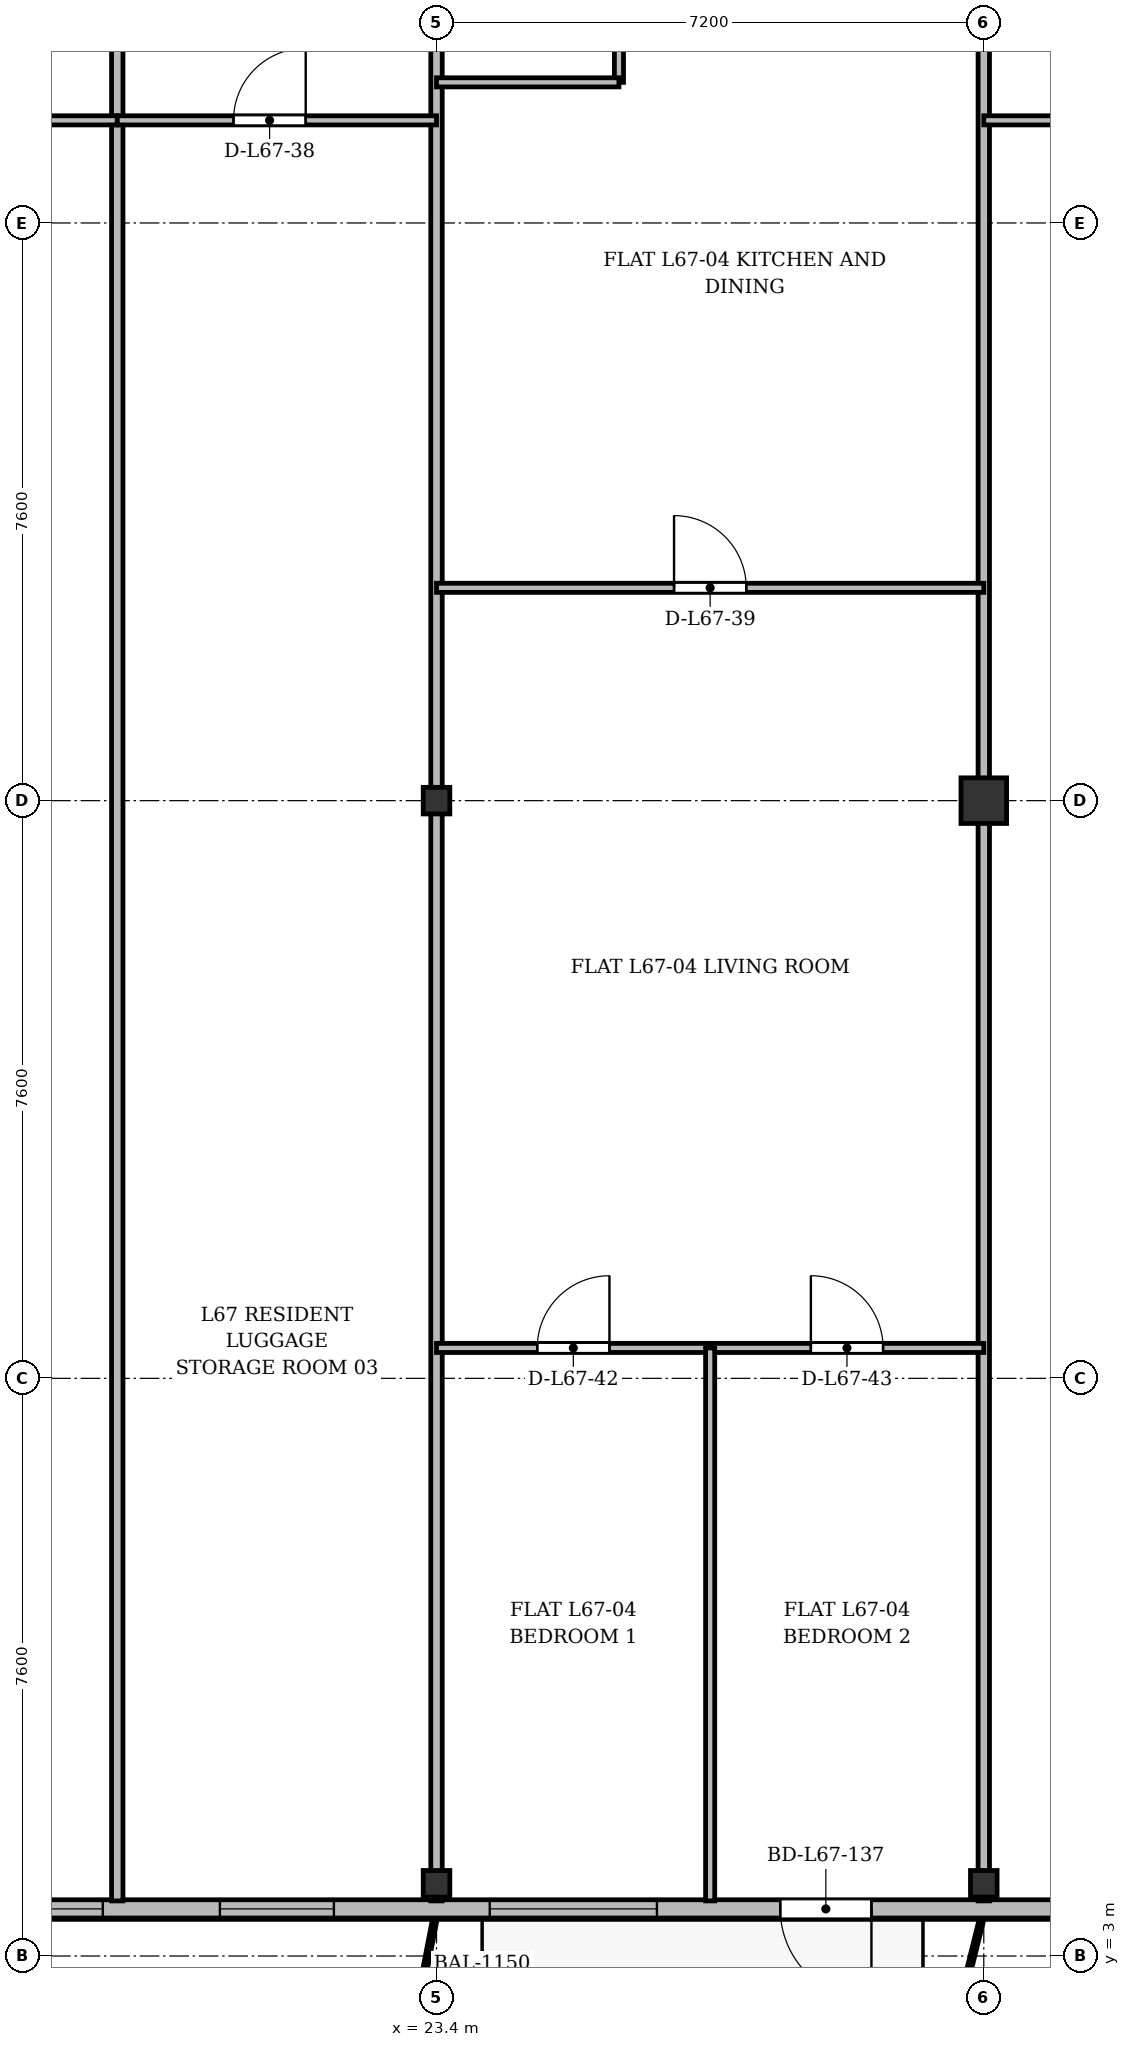
"""IFC4 building model, lengths in metres.
Left out: names, types, materials, properties, quantities, classifications, styles, units other than length and angle.
Written with IfcOpenShell. Run it as: python <this file> out.ifc"""

import sys

from ifc_helpers import new_model, si_unit, direction, frame, frame_2d, origin, origin_2d, place, context, subcontext, project, spatial, rectangle, i_section, extrude, source, transform, mapped, element, fill, save


model = new_model("IFC4")
c1 = context("Model", 3, precision=1e-05, world=origin(), true_north=direction((0.0, 1.0)))
c2 = subcontext(c1, "Body", "Model", "MODEL_VIEW")
j1 = project(units=[si_unit("LENGTHUNIT", "METRE"), si_unit("PLANEANGLEUNIT", "RADIAN")], contexts=[c1])
p1 = place(None, origin())
s1 = spatial("IfcSite", under=j1, at=p1, CompositionType="ELEMENT")
p2 = place(p1, origin())
s2 = spatial("IfcBuilding", under=s1, at=p2, CompositionType="ELEMENT")
p3 = place(p2, frame((0.0, 0.0, 259.5)))
s3 = spatial("IfcBuildingStorey", under=s2, at=p3, CompositionType="ELEMENT", Elevation=259.5)
m1 = source(origin(), c2, "Body", "SweptSolid", [
    extrude(i_section(OverallWidth=0.35, OverallDepth=0.35, WebThickness=0.018, FlangeThickness=0.028, at=origin_2d()), origin(), (0.0, 0.0, 1.0), 3.6),
])
for number, where, z_axis, x_axis in (
    (1, (23.4, 3.95, 0.0), (0.0, 0.0, 1.0), (1.0, 0.0, 0.0)),
    (2, (23.4, 18.2, 0.0), (0.0, 0.0, 1.0), (1.0, 0.0, 0.0)),
    (3, (30.6, 3.95, 0.0), (0.0, 0.0, 1.0), (1.0, 0.0, 0.0)),
):
    element("IfcColumn", number, at=place(p3, frame(where, z_axis=z_axis, x_axis=x_axis)), inside=s3, PredefinedType="COLUMN", context=c2, shape_type="MappedRepresentation", body=[
        mapped(m1, transform((0.0, 0.0, 0.0), x_axis=(1.0, 0.0, 0.0), y_axis=(0.0, 1.0, 0.0), z_axis=(0.0, 0.0, 1.0), scale=1.0)),
    ])
m2 = source(origin(), c2, "Body", "SweptSolid", [
    extrude(rectangle(XDim=0.6, YDim=0.6, at=origin_2d()), origin(), (0.0, 0.0, 1.0), 3.6),
])
p4 = place(p3, frame((30.6, 18.2, 0.0), z_axis=(0.0, 0.0, 1.0), x_axis=(1.0, 0.0, 0.0)))
e4 = element("IfcColumn", 4, at=p4, inside=s3, PredefinedType="COLUMN", context=c2, shape_type="MappedRepresentation", body=[
    mapped(m2, transform((0.0, 0.0, 0.0), x_axis=(1.0, 0.0, 0.0), y_axis=(0.0, 1.0, 0.0), z_axis=(0.0, 0.0, 1.0), scale=1.0)),
])
p5 = place(p3, frame((63.2, 3.62, 0.0), z_axis=(0.0, 0.0, 1.0), x_axis=(-1.0, 0.0, 0.0)))
e5 = element("IfcWall", 5, at=p5, inside=s3, PredefinedType="SOLIDWALL", context=c2, shape_type="SweptSolid", body=[
    extrude(rectangle(XDim=52.0, YDim=0.24, at=frame_2d((26.0, 0.0))), origin(), (0.0, 0.0, 1.0), 3.37),
])
p6 = place(p5, frame((0.345, 0.0, 0.9)))
e6 = element("IfcOpeningElement", 6, at=p6, cuts=e5, PredefinedType="OPENING", context=c2, shape_type="SweptSolid", body=[
    extrude(rectangle(XDim=1.2, YDim=1.65, at=frame_2d((0.6, 0.825))), frame((0.0, 0.13, 0.0), z_axis=(0.0, -1.0, 0.0), x_axis=(1.0, 0.0, 0.0)), (0.0, 0.0, 1.0), 0.26),
])
p7 = place(p5, frame((2.05, 0.0, 0.9)))
e7 = element("IfcOpeningElement", 7, at=p7, cuts=e5, PredefinedType="OPENING", context=c2, shape_type="SweptSolid", body=[
    extrude(rectangle(XDim=2.0, YDim=1.95, at=frame_2d((1.0, 0.975))), frame((0.0, 0.13, 0.0), z_axis=(0.0, -1.0, 0.0), x_axis=(1.0, 0.0, 0.0)), (0.0, 0.0, 1.0), 0.26),
])
p8 = place(p5, frame((5.42, 0.0, 0.0)))
e8 = element("IfcOpeningElement", 8, at=p8, cuts=e5, PredefinedType="OPENING", context=c2, shape_type="SweptSolid", body=[
    extrude(rectangle(XDim=1.2, YDim=2.2, at=frame_2d((0.6, 1.1))), frame((0.0, 0.13, 0.0), z_axis=(0.0, -1.0, 0.0), x_axis=(1.0, 0.0, 0.0)), (0.0, 0.0, 1.0), 0.26),
])
p9 = place(p5, frame((8.6, 0.0, 0.9)))
e9 = element("IfcOpeningElement", 9, at=p9, cuts=e5, PredefinedType="OPENING", context=c2, shape_type="SweptSolid", body=[
    extrude(rectangle(XDim=1.8, YDim=1.8, at=frame_2d((0.9, 0.9))), frame((0.0, 0.13, 0.0), z_axis=(0.0, -1.0, 0.0), x_axis=(1.0, 0.0, 0.0)), (0.0, 0.0, 1.0), 0.26),
])
p10 = place(p5, frame((14.7, 0.0, 0.9)))
e10 = element("IfcOpeningElement", 10, at=p10, cuts=e5, PredefinedType="OPENING", context=c2, shape_type="SweptSolid", body=[
    extrude(rectangle(XDim=2.2, YDim=1.8, at=frame_2d((1.1, 0.9))), frame((0.0, 0.13, 0.0), z_axis=(0.0, -1.0, 0.0), x_axis=(1.0, 0.0, 0.0)), (0.0, 0.0, 1.0), 0.26),
])
p11 = place(p5, frame((20.5, 0.0, 0.9)))
e11 = element("IfcOpeningElement", 11, at=p11, cuts=e5, PredefinedType="OPENING", context=c2, shape_type="SweptSolid", body=[
    extrude(rectangle(XDim=1.5, YDim=1.75, at=frame_2d((0.75, 0.875))), frame((0.0, 0.13, 0.0), z_axis=(0.0, -1.0, 0.0), x_axis=(1.0, 0.0, 0.0)), (0.0, 0.0, 1.0), 0.26),
])
p12 = place(p5, frame((23.95, 0.0, 0.9)))
e12 = element("IfcOpeningElement", 12, at=p12, cuts=e5, PredefinedType="OPENING", context=c2, shape_type="SweptSolid", body=[
    extrude(rectangle(XDim=2.0, YDim=1.95, at=frame_2d((1.0, 0.975))), frame((0.0, 0.13, 0.0), z_axis=(0.0, -1.0, 0.0), x_axis=(1.0, 0.0, 0.0)), (0.0, 0.0, 1.0), 0.26),
])
p13 = place(p5, frame((28.875, 0.0, 0.9)))
e13 = element("IfcOpeningElement", 13, at=p13, cuts=e5, PredefinedType="OPENING", context=c2, shape_type="SweptSolid", body=[
    extrude(rectangle(XDim=1.65, YDim=1.85, at=frame_2d((0.825, 0.925))), frame((0.0, 0.13, 0.0), z_axis=(0.0, -1.0, 0.0), x_axis=(1.0, 0.0, 0.0)), (0.0, 0.0, 1.0), 0.26),
])
p14 = place(p5, frame((34.078, 0.0, 0.0)))
e14 = element("IfcOpeningElement", 14, at=p14, cuts=e5, PredefinedType="OPENING", context=c2, shape_type="SweptSolid", body=[
    extrude(rectangle(XDim=1.2, YDim=2.2, at=frame_2d((0.6, 1.1))), frame((0.0, 0.13, 0.0), z_axis=(0.0, -1.0, 0.0), x_axis=(1.0, 0.0, 0.0)), (0.0, 0.0, 1.0), 0.26),
])
p15 = place(p5, frame((36.9, 0.0, 0.9)))
e15 = element("IfcOpeningElement", 15, at=p15, cuts=e5, PredefinedType="OPENING", context=c2, shape_type="SweptSolid", body=[
    extrude(rectangle(XDim=2.2, YDim=1.8, at=frame_2d((1.1, 0.9))), frame((0.0, 0.13, 0.0), z_axis=(0.0, -1.0, 0.0), x_axis=(1.0, 0.0, 0.0)), (0.0, 0.0, 1.0), 0.26),
])
p16 = place(p5, frame((41.15, 0.0, 0.9)))
e16 = element("IfcOpeningElement", 16, at=p16, cuts=e5, PredefinedType="OPENING", context=c2, shape_type="SweptSolid", body=[
    extrude(rectangle(XDim=1.5, YDim=1.75, at=frame_2d((0.75, 0.875))), frame((0.0, 0.13, 0.0), z_axis=(0.0, -1.0, 0.0), x_axis=(1.0, 0.0, 0.0)), (0.0, 0.0, 1.0), 0.26),
])
p17 = place(p5, frame((44.19, 0.0, 0.9)))
e17 = element("IfcOpeningElement", 17, at=p17, cuts=e5, PredefinedType="OPENING", context=c2, shape_type="SweptSolid", body=[
    extrude(rectangle(XDim=2.0, YDim=1.95, at=frame_2d((1.0, 0.975))), frame((0.0, 0.13, 0.0), z_axis=(0.0, -1.0, 0.0), x_axis=(1.0, 0.0, 0.0)), (0.0, 0.0, 1.0), 0.26),
])
p18 = place(p5, frame((49.93, 0.0, 0.9)))
e18 = element("IfcOpeningElement", 18, at=p18, cuts=e5, PredefinedType="OPENING", context=c2, shape_type="SweptSolid", body=[
    extrude(rectangle(XDim=1.65, YDim=1.85, at=frame_2d((0.825, 0.925))), frame((0.0, 0.13, 0.0), z_axis=(0.0, -1.0, 0.0), x_axis=(1.0, 0.0, 0.0)), (0.0, 0.0, 1.0), 0.26),
])
p19 = place(p3, frame((19.2, 3.725, 0.0), z_axis=(0.0, 0.0, 1.0), x_axis=(0.0, 1.0, 0.0)))
e19 = element("IfcWall", 19, at=p19, inside=s3, PredefinedType="PARTITIONING", context=c2, shape_type="SweptSolid", body=[
    extrude(rectangle(XDim=27.275, YDim=0.15, at=frame_2d((13.637, 0.0))), origin(), (0.0, 0.0, 1.0), 2.92),
])
for number, where, z_axis, x_axis in (
    (20, (23.4, 3.725, 0.0), (0.0, 0.0, 1.0), (0.0, 1.0, 0.0)),
    (21, (30.6, 3.725, 0.0), (0.0, 0.0, 1.0), (0.0, 1.0, 0.0)),
):
    element("IfcWall", number, at=place(p3, frame(where, z_axis=z_axis, x_axis=x_axis)), inside=s3, PredefinedType="PARTITIONING", context=c2, shape_type="SweptSolid", body=[
        extrude(rectangle(XDim=27.275, YDim=0.15, at=frame_2d((13.637, 0.0))), origin(), (0.0, 0.0, 1.0), 2.87),
    ])
p20 = place(p3, frame((13.6, 27.15, 0.0), z_axis=(0.0, 0.0, 1.0), x_axis=(1.0, 0.0, 0.0)))
e22 = element("IfcWall", 22, at=p20, inside=s3, PredefinedType="PARTITIONING", context=c2, shape_type="SweptSolid", body=[
    extrude(rectangle(XDim=5.6, YDim=0.12, at=frame_2d((2.8, 0.0))), origin(), (0.0, 0.0, 1.0), 2.87),
])
p21 = place(p20, frame((2.232, 0.0, 0.0)))
e23 = element("IfcOpeningElement", 23, at=p21, cuts=e22, PredefinedType="OPENING", context=c2, shape_type="SweptSolid", body=[
    extrude(rectangle(XDim=0.95, YDim=2.15, at=frame_2d((0.475, 1.075))), frame((0.0, 0.07, 0.0), z_axis=(0.0, -1.0, 0.0), x_axis=(1.0, 0.0, 0.0)), (0.0, 0.0, 1.0), 0.14),
])
p22 = place(p3, frame((19.2, 27.15, 0.0), z_axis=(0.0, 0.0, 1.0), x_axis=(1.0, 0.0, 0.0)))
e24 = element("IfcWall", 24, at=p22, inside=s3, PredefinedType="PARTITIONING", context=c2, shape_type="SweptSolid", body=[
    extrude(rectangle(XDim=4.2, YDim=0.12, at=frame_2d((2.1, 0.0))), origin(), (0.0, 0.0, 1.0), 2.87),
])
p23 = place(p22, frame((1.529, 0.0, 0.0)))
e25 = element("IfcOpeningElement", 25, at=p23, cuts=e24, PredefinedType="OPENING", context=c2, shape_type="SweptSolid", body=[
    extrude(rectangle(XDim=0.95, YDim=2.15, at=frame_2d((0.475, 1.075))), frame((0.0, 0.07, 0.0), z_axis=(0.0, -1.0, 0.0), x_axis=(1.0, 0.0, 0.0)), (0.0, 0.0, 1.0), 0.14),
])
p24 = place(p3, frame((23.4, 21.0, 0.0), z_axis=(0.0, 0.0, 1.0), x_axis=(1.0, 0.0, 0.0)))
e26 = element("IfcWall", 26, at=p24, inside=s3, PredefinedType="PARTITIONING", context=c2, shape_type="SweptSolid", body=[
    extrude(rectangle(XDim=7.2, YDim=0.12, at=frame_2d((3.6, 0.0))), origin(), (0.0, 0.0, 1.0), 2.87),
])
p25 = place(p24, frame((3.125, 0.0, 0.0)))
e27 = element("IfcOpeningElement", 27, at=p25, cuts=e26, PredefinedType="OPENING", context=c2, shape_type="SweptSolid", body=[
    extrude(rectangle(XDim=0.95, YDim=2.15, at=frame_2d((0.475, 1.075))), frame((0.0, 0.07, 0.0), z_axis=(0.0, -1.0, 0.0), x_axis=(1.0, 0.0, 0.0)), (0.0, 0.0, 1.0), 0.14),
])
p26 = place(p3, frame((25.8, 27.65, 0.0), z_axis=(0.0, 0.0, 1.0), x_axis=(0.0, 1.0, 0.0)))
e28 = element("IfcWall", 28, at=p26, inside=s3, PredefinedType="PARTITIONING", context=c2, shape_type="SweptSolid", body=[
    extrude(rectangle(XDim=3.35, YDim=0.12, at=frame_2d((1.675, 0.0))), origin(), (0.0, 0.0, 1.0), 3.37),
])
p27 = place(p26, frame((0.8, 0.0, 0.0)))
e29 = element("IfcOpeningElement", 29, at=p27, cuts=e28, PredefinedType="OPENING", context=c2, shape_type="SweptSolid", body=[
    extrude(rectangle(XDim=0.85, YDim=2.1, at=frame_2d((0.425, 1.05))), frame((0.0, 0.07, 0.0), z_axis=(0.0, -1.0, 0.0), x_axis=(1.0, 0.0, 0.0)), (0.0, 0.0, 1.0), 0.14),
])
p28 = place(p3, frame((23.4, 27.65, 0.0), z_axis=(0.0, 0.0, 1.0), x_axis=(1.0, 0.0, 0.0)))
e30 = element("IfcWall", 30, at=p28, inside=s3, PredefinedType="PARTITIONING", context=c2, shape_type="SweptSolid", body=[
    extrude(rectangle(XDim=2.4, YDim=0.12, at=frame_2d((1.2, 0.0))), origin(), (0.0, 0.0, 1.0), 2.87),
])
p29 = place(p3, frame((23.4, 11.0, 0.0), z_axis=(0.0, 0.0, 1.0), x_axis=(1.0, 0.0, 0.0)))
e31 = element("IfcWall", 31, at=p29, inside=s3, PredefinedType="PARTITIONING", context=c2, shape_type="SweptSolid", body=[
    extrude(rectangle(XDim=3.6, YDim=0.12, at=frame_2d((1.8, 0.0))), origin(), (0.0, 0.0, 1.0), 2.87),
])
p30 = place(p29, frame((1.325, 0.0, 0.0)))
e32 = element("IfcOpeningElement", 32, at=p30, cuts=e31, PredefinedType="OPENING", context=c2, shape_type="SweptSolid", body=[
    extrude(rectangle(XDim=0.95, YDim=2.15, at=frame_2d((0.475, 1.075))), frame((0.0, 0.07, 0.0), z_axis=(0.0, -1.0, 0.0), x_axis=(1.0, 0.0, 0.0)), (0.0, 0.0, 1.0), 0.14),
])
p31 = place(p3, frame((27.0, 11.0, 0.0), z_axis=(0.0, 0.0, 1.0), x_axis=(1.0, 0.0, 0.0)))
e33 = element("IfcWall", 33, at=p31, inside=s3, PredefinedType="PARTITIONING", context=c2, shape_type="SweptSolid", body=[
    extrude(rectangle(XDim=3.6, YDim=0.12, at=frame_2d((1.8, 0.0))), origin(), (0.0, 0.0, 1.0), 2.87),
])
p32 = place(p31, frame((1.325, 0.0, 0.0)))
e34 = element("IfcOpeningElement", 34, at=p32, cuts=e33, PredefinedType="OPENING", context=c2, shape_type="SweptSolid", body=[
    extrude(rectangle(XDim=0.95, YDim=2.15, at=frame_2d((0.475, 1.075))), frame((0.0, 0.07, 0.0), z_axis=(0.0, -1.0, 0.0), x_axis=(1.0, 0.0, 0.0)), (0.0, 0.0, 1.0), 0.14),
])
p33 = place(p3, frame((27.0, 3.725, 0.0), z_axis=(0.0, 0.0, 1.0), x_axis=(0.0, 1.0, 0.0)))
e35 = element("IfcWall", 35, at=p33, inside=s3, PredefinedType="PARTITIONING", context=c2, shape_type="SweptSolid", body=[
    extrude(rectangle(XDim=7.275, YDim=0.12, at=frame_2d((3.637, 0.0))), origin(), (0.0, 0.0, 1.0), 2.92),
])
p34 = place(p3, frame((30.6, 27.15, 0.0), z_axis=(0.0, 0.0, 1.0), x_axis=(1.0, 0.0, 0.0)))
e36 = element("IfcWall", 36, at=p34, inside=s3, PredefinedType="PARTITIONING", context=c2, shape_type="SweptSolid", body=[
    extrude(rectangle(XDim=5.8, YDim=0.12, at=frame_2d((2.9, 0.0))), origin(), (0.0, 0.0, 1.0), 2.87),
])
p35 = place(p34, frame((2.425, 0.0, 0.0)))
e37 = element("IfcOpeningElement", 37, at=p35, cuts=e36, PredefinedType="OPENING", context=c2, shape_type="SweptSolid", body=[
    extrude(rectangle(XDim=0.95, YDim=2.15, at=frame_2d((0.475, 1.075))), frame((0.0, 0.07, 0.0), z_axis=(0.0, -1.0, 0.0), x_axis=(1.0, 0.0, 0.0)), (0.0, 0.0, 1.0), 0.14),
])
m3 = source(origin(), c2, "Body", "SweptSolid", [
    extrude(rectangle(XDim=1.2, YDim=2.2, at=frame_2d((0.6, 1.1))), frame((0.0, 0.025, 0.0), z_axis=(0.0, -1.0, 0.0), x_axis=(1.0, 0.0, 0.0)), (0.0, 0.0, 1.0), 0.05),
])
p36 = place(p14, origin())
e38 = element("IfcDoor", 38, at=p36, inside=s3, OperationType="SINGLE_SWING_LEFT", PredefinedType="DOOR", context=c2, shape_type="MappedRepresentation", body=[
    mapped(m3, transform((0.0, 0.0, 0.0), x_axis=(1.0, 0.0, 0.0), y_axis=(0.0, 1.0, 0.0), z_axis=(0.0, 0.0, 1.0), scale=1.0)),
])
fill(e14, e38)
m4 = source(origin(), c2, "Body", "SweptSolid", [
    extrude(rectangle(XDim=2.2, YDim=1.8, at=frame_2d((1.1, 0.9))), frame((0.0, 0.03, 0.0), z_axis=(0.0, -1.0, 0.0), x_axis=(1.0, 0.0, 0.0)), (0.0, 0.0, 1.0), 0.06),
])
p37 = place(p15, origin())
e39 = element("IfcWindow", 39, at=p37, inside=s3, PartitioningType="SINGLE_PANEL", PredefinedType="WINDOW", context=c2, shape_type="MappedRepresentation", body=[
    mapped(m4, transform((0.0, 0.0, 0.0), x_axis=(1.0, 0.0, 0.0), y_axis=(0.0, 1.0, 0.0), z_axis=(0.0, 0.0, 1.0), scale=1.0)),
])
fill(e15, e39)
m5 = source(origin(), c2, "Body", "SweptSolid", [
    extrude(rectangle(XDim=1.5, YDim=1.75, at=frame_2d((0.75, 0.875))), frame((0.0, 0.03, 0.0), z_axis=(0.0, -1.0, 0.0), x_axis=(1.0, 0.0, 0.0)), (0.0, 0.0, 1.0), 0.06),
])
p38 = place(p16, origin())
e40 = element("IfcWindow", 40, at=p38, inside=s3, PartitioningType="SINGLE_PANEL", PredefinedType="WINDOW", context=c2, shape_type="MappedRepresentation", body=[
    mapped(m5, transform((0.0, 0.0, 0.0), x_axis=(1.0, 0.0, 0.0), y_axis=(0.0, 1.0, 0.0), z_axis=(0.0, 0.0, 1.0), scale=1.0)),
])
fill(e16, e40)
m6 = source(origin(), c2, "Body", "SweptSolid", [
    extrude(rectangle(XDim=2.0, YDim=1.95, at=frame_2d((1.0, 0.975))), frame((0.0, 0.03, 0.0), z_axis=(0.0, -1.0, 0.0), x_axis=(1.0, 0.0, 0.0)), (0.0, 0.0, 1.0), 0.06),
])
p39 = place(p17, origin())
e41 = element("IfcWindow", 41, at=p39, inside=s3, PartitioningType="SINGLE_PANEL", PredefinedType="WINDOW", context=c2, shape_type="MappedRepresentation", body=[
    mapped(m6, transform((0.0, 0.0, 0.0), x_axis=(1.0, 0.0, 0.0), y_axis=(0.0, 1.0, 0.0), z_axis=(0.0, 0.0, 1.0), scale=1.0)),
])
fill(e17, e41)
m7 = source(origin(), c2, "Body", "SweptSolid", [
    extrude(rectangle(XDim=0.95, YDim=2.15, at=frame_2d((0.475, 1.075))), frame((0.0, 0.025, 0.0), z_axis=(0.0, -1.0, 0.0), x_axis=(1.0, 0.0, 0.0)), (0.0, 0.0, 1.0), 0.05),
])
p40 = place(p23, origin())
e42 = element("IfcDoor", 42, at=p40, inside=s3, OperationType="SINGLE_SWING_RIGHT", PredefinedType="DOOR", context=c2, shape_type="MappedRepresentation", body=[
    mapped(m7, transform((0.0, 0.0, 0.0), x_axis=(1.0, 0.0, 0.0), y_axis=(0.0, 1.0, 0.0), z_axis=(0.0, 0.0, 1.0), scale=1.0)),
])
fill(e25, e42)
p41 = place(p25, origin())
e43 = element("IfcDoor", 43, at=p41, inside=s3, OperationType="SINGLE_SWING_LEFT", PredefinedType="DOOR", context=c2, shape_type="MappedRepresentation", body=[
    mapped(m7, transform((0.0, 0.0, 0.0), x_axis=(1.0, 0.0, 0.0), y_axis=(0.0, 1.0, 0.0), z_axis=(0.0, 0.0, 1.0), scale=1.0)),
])
fill(e27, e43)
p42 = place(p30, origin())
e44 = element("IfcDoor", 44, at=p42, inside=s3, OperationType="SINGLE_SWING_RIGHT", PredefinedType="DOOR", context=c2, shape_type="MappedRepresentation", body=[
    mapped(m7, transform((0.0, 0.0, 0.0), x_axis=(1.0, 0.0, 0.0), y_axis=(0.0, 1.0, 0.0), z_axis=(0.0, 0.0, 1.0), scale=1.0)),
])
fill(e32, e44)
p43 = place(p32, origin())
e45 = element("IfcDoor", 45, at=p43, inside=s3, OperationType="SINGLE_SWING_LEFT", PredefinedType="DOOR", context=c2, shape_type="MappedRepresentation", body=[
    mapped(m7, transform((0.0, 0.0, 0.0), x_axis=(1.0, 0.0, 0.0), y_axis=(0.0, 1.0, 0.0), z_axis=(0.0, 0.0, 1.0), scale=1.0)),
])
fill(e34, e45)
save(model, sys.argv[1])
